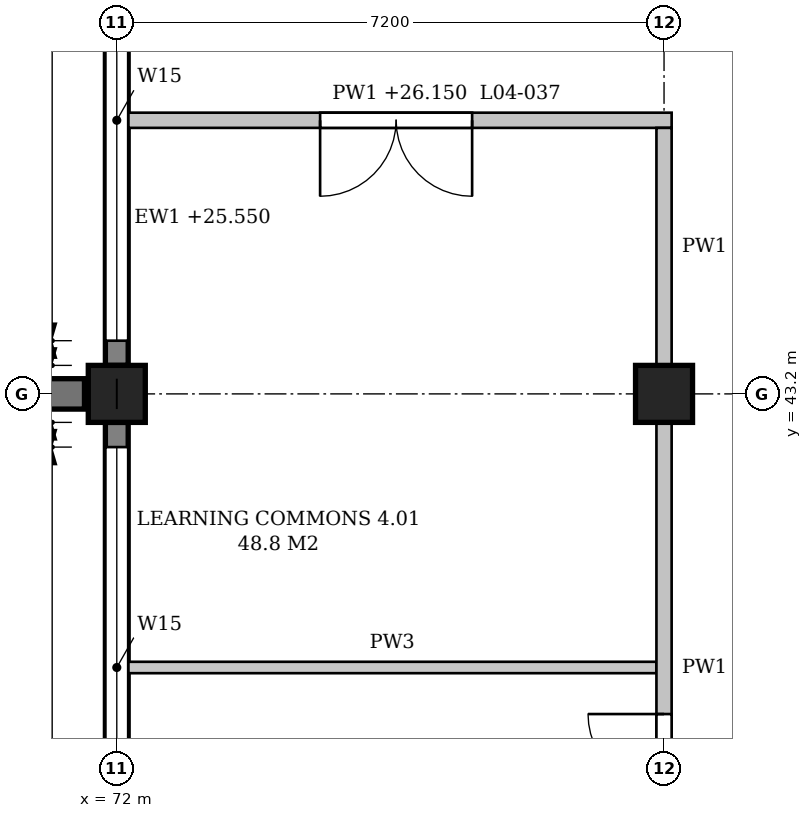
"""IFC4 building model, lengths in metres.
Left out: names, types, materials, properties, quantities, classifications, styles, units other than length and angle.
Written with IfcOpenShell. Run it as: python <this file> out.ifc"""

import sys

from ifc_helpers import new_model, si_unit, direction, frame, frame_2d, origin, origin_2d, place, context, subcontext, project, spatial, polyline, rectangle, outline, extrude, element, fill, save


model = new_model("IFC4")
c1 = context("Model", 3, precision=1e-05, world=origin(), true_north=direction((0.0, 1.0)))
c2 = subcontext(c1, "Body", "Model", "MODEL_VIEW")
j1 = project(units=[si_unit("LENGTHUNIT", "METRE"), si_unit("PLANEANGLEUNIT", "RADIAN")], contexts=[c1])
p1 = place(None, origin())
s1 = spatial("IfcSite", under=j1, at=p1, CompositionType="ELEMENT")
p2 = place(p1, origin())
s2 = spatial("IfcBuilding", under=s1, at=p2, CompositionType="ELEMENT")
p3 = place(p2, frame((0.0, 0.0, 21.6)))
s3 = spatial("IfcBuildingStorey", under=s2, at=p3, CompositionType="ELEMENT", Elevation=21.6)
for number, where, z_axis, x_axis in (
    (1, (72.0, 43.2, 0.0), (0.0, 0.0, 1.0), (1.0, 0.0, 0.0)),
    (2, (79.2, 43.2, 0.0), (0.0, 0.0, 1.0), (1.0, 0.0, 0.0)),
):
    element("IfcColumn", number, at=place(p3, frame(where, z_axis=z_axis, x_axis=x_axis)), inside=s3, PredefinedType="COLUMN", context=c2, shape_type="SweptSolid", body=[
        extrude(rectangle(XDim=0.75, YDim=0.75, at=origin_2d()), origin(), (0.0, 0.0, 1.0), 4.8),
    ])
p4 = place(p3, frame((72.0, 36.375, 0.0), z_axis=(0.0, 0.0, 1.0), x_axis=(0.0, 1.0, 0.0)))
e3 = element("IfcWall", 3, at=p4, inside=s3, PredefinedType="STANDARD", context=c2, shape_type="SweptSolid", body=[
    extrude(rectangle(XDim=6.45, YDim=0.3, at=frame_2d((3.225, 0.0))), origin(), (0.0, 0.0, 1.0), 3.95),
])
p5 = place(p4, frame((0.325, 0.0, 0.9)))
e4 = element("IfcOpeningElement", 4, at=p5, cuts=e3, PredefinedType="OPENING", context=c2, shape_type="SweptSolid", body=[
    extrude(outline(polyline([(0.0, 0.0), (5.8, 0.0), (5.8, 1.0), (2.9, 2.5), (0.0, 1.0), (0.0, 0.0)])), frame((0.0, 0.16, 0.0), z_axis=(0.0, -1.0, 0.0), x_axis=(1.0, 0.0, 0.0)), (0.0, 0.0, 1.0), 0.32),
])
p6 = place(p3, frame((72.0, 43.575, 0.0), z_axis=(0.0, 0.0, 1.0), x_axis=(0.0, 1.0, 0.0)))
e5 = element("IfcWall", 5, at=p6, inside=s3, PredefinedType="STANDARD", context=c2, shape_type="SweptSolid", body=[
    extrude(rectangle(XDim=6.45, YDim=0.3, at=frame_2d((3.225, 0.0))), origin(), (0.0, 0.0, 1.0), 3.95),
])
p7 = place(p6, frame((0.325, 0.0, 0.9)))
e6 = element("IfcOpeningElement", 6, at=p7, cuts=e5, PredefinedType="OPENING", context=c2, shape_type="SweptSolid", body=[
    extrude(outline(polyline([(0.0, 0.0), (5.8, 0.0), (5.8, 1.0), (2.9, 2.5), (0.0, 1.0), (0.0, 0.0)])), frame((0.0, 0.16, 0.0), z_axis=(0.0, -1.0, 0.0), x_axis=(1.0, 0.0, 0.0)), (0.0, 0.0, 1.0), 0.32),
])
p8 = place(p3, frame((71.575, 43.2, -0.25), z_axis=(0.0, 0.0, 1.0), x_axis=(-1.0, 0.0, 0.0)))
e7 = element("IfcWall", 7, at=p8, inside=s3, PredefinedType="POLYGONAL", context=c2, shape_type="SweptSolid", body=[
    extrude(outline(polyline([(0.6, 0.0), (0.6, 9.175), (0.15, 9.85), (0.0, 9.85), (0.0, 0.0), (0.6, 0.0)])), frame((0.0, 0.2, 0.0), z_axis=(0.0, -1.0, 0.0), x_axis=(1.0, 0.0, 0.0)), (0.0, 0.0, 1.0), 0.4),
])
p9 = place(p3, frame((72.15, 39.6, 0.0), z_axis=(0.0, 0.0, 1.0), x_axis=(1.0, 0.0, 0.0)))
e8 = element("IfcWall", 8, at=p9, inside=s3, PredefinedType="PARTITIONING", context=c2, shape_type="SweptSolid", body=[
    extrude(rectangle(XDim=6.95, YDim=0.15, at=frame_2d((3.475, 0.0))), origin(), (0.0, 0.0, 1.0), 3.8),
])
p10 = place(p3, frame((72.15, 46.8, 0.0), z_axis=(0.0, 0.0, 1.0), x_axis=(1.0, 0.0, 0.0)))
e9 = element("IfcWall", 9, at=p10, inside=s3, PredefinedType="PARTITIONING", context=c2, shape_type="SweptSolid", body=[
    extrude(outline(polyline([(0.0, 0.0), (7.15, 0.0), (7.15, 3.8), (6.8, 3.8), (6.8, 4.55), (0.1, 4.55), (0.1, 3.95), (0.0, 3.95), (0.0, 0.0)])), frame((0.0, 0.1, 0.0), z_axis=(0.0, -1.0, 0.0), x_axis=(1.0, 0.0, 0.0)), (0.0, 0.0, 1.0), 0.2),
])
p11 = place(p10, frame((2.525, 0.0, 0.0)))
e10 = element("IfcOpeningElement", 10, at=p11, cuts=e9, PredefinedType="OPENING", context=c2, shape_type="SweptSolid", body=[
    extrude(rectangle(XDim=2.0, YDim=2.1, at=frame_2d((1.0, 1.05))), frame((0.0, 0.11, 0.0), z_axis=(0.0, -1.0, 0.0), x_axis=(1.0, 0.0, 0.0)), (0.0, 0.0, 1.0), 0.22),
])
p12 = place(p3, frame((79.2, 36.375, 0.0), z_axis=(0.0, 0.0, 1.0), x_axis=(0.0, 1.0, 0.0)))
e11 = element("IfcWall", 11, at=p12, inside=s3, PredefinedType="PARTITIONING", context=c2, shape_type="SweptSolid", body=[
    extrude(rectangle(XDim=6.45, YDim=0.2, at=frame_2d((3.225, 0.0))), origin(), (0.0, 0.0, 1.0), 3.8),
])
p13 = place(p12, frame((0.613, 0.0, 0.0)))
e12 = element("IfcOpeningElement", 12, at=p13, cuts=e11, PredefinedType="OPENING", context=c2, shape_type="SweptSolid", body=[
    extrude(rectangle(XDim=2.0, YDim=2.1, at=frame_2d((1.0, 1.05))), frame((0.0, 0.11, 0.0), z_axis=(0.0, -1.0, 0.0), x_axis=(1.0, 0.0, 0.0)), (0.0, 0.0, 1.0), 0.22),
])
p14 = place(p3, frame((79.2, 43.575, 0.0), z_axis=(0.0, 0.0, 1.0), x_axis=(0.0, 1.0, 0.0)))
e13 = element("IfcWall", 13, at=p14, inside=s3, PredefinedType="PARTITIONING", context=c2, shape_type="SweptSolid", body=[
    extrude(rectangle(XDim=3.125, YDim=0.2, at=frame_2d((1.562, 0.0))), origin(), (0.0, 0.0, 1.0), 3.8),
])
p15 = place(p5, origin())
e14 = element("IfcWindow", 14, at=p15, inside=s3, PartitioningType="TRIPLE_PANEL_VERTICAL", PredefinedType="WINDOW", context=c2, shape_type="SweptSolid", body=[
    extrude(outline(polyline([(0.0, 0.0), (5.8, 0.0), (5.8, 1.0), (2.9, 2.5), (0.0, 1.0), (0.0, 0.0)])), frame((0.0, 0.03, 0.0), z_axis=(0.0, -1.0, 0.0), x_axis=(1.0, 0.0, 0.0)), (0.0, 0.0, 1.0), 0.06),
])
fill(e4, e14)
p16 = place(p7, origin())
e15 = element("IfcWindow", 15, at=p16, inside=s3, PartitioningType="TRIPLE_PANEL_VERTICAL", PredefinedType="WINDOW", context=c2, shape_type="SweptSolid", body=[
    extrude(outline(polyline([(0.0, 0.0), (5.8, 0.0), (5.8, 1.0), (2.9, 2.5), (0.0, 1.0), (0.0, 0.0)])), frame((0.0, 0.03, 0.0), z_axis=(0.0, -1.0, 0.0), x_axis=(1.0, 0.0, 0.0)), (0.0, 0.0, 1.0), 0.06),
])
fill(e6, e15)
p17 = place(p13, origin())
e16 = element("IfcDoor", 16, at=p17, inside=s3, OperationType="DOUBLE_DOOR_SINGLE_SWING", PredefinedType="DOOR", context=c2, shape_type="SweptSolid", body=[
    extrude(rectangle(XDim=2.0, YDim=2.1, at=frame_2d((1.0, 1.05))), frame((0.0, 0.025, 0.0), z_axis=(0.0, -1.0, 0.0), x_axis=(1.0, 0.0, 0.0)), (0.0, 0.0, 1.0), 0.05),
])
fill(e12, e16)
p18 = place(p11, origin())
e17 = element("IfcDoor", 17, at=p18, inside=s3, OperationType="DOUBLE_DOOR_SINGLE_SWING", PredefinedType="DOOR", context=c2, shape_type="SweptSolid", body=[
    extrude(rectangle(XDim=2.0, YDim=2.1, at=frame_2d((1.0, 1.05))), frame((0.0, 0.025, 0.0), z_axis=(0.0, -1.0, 0.0), x_axis=(1.0, 0.0, 0.0)), (0.0, 0.0, 1.0), 0.05),
])
fill(e10, e17)
save(model, sys.argv[1])
